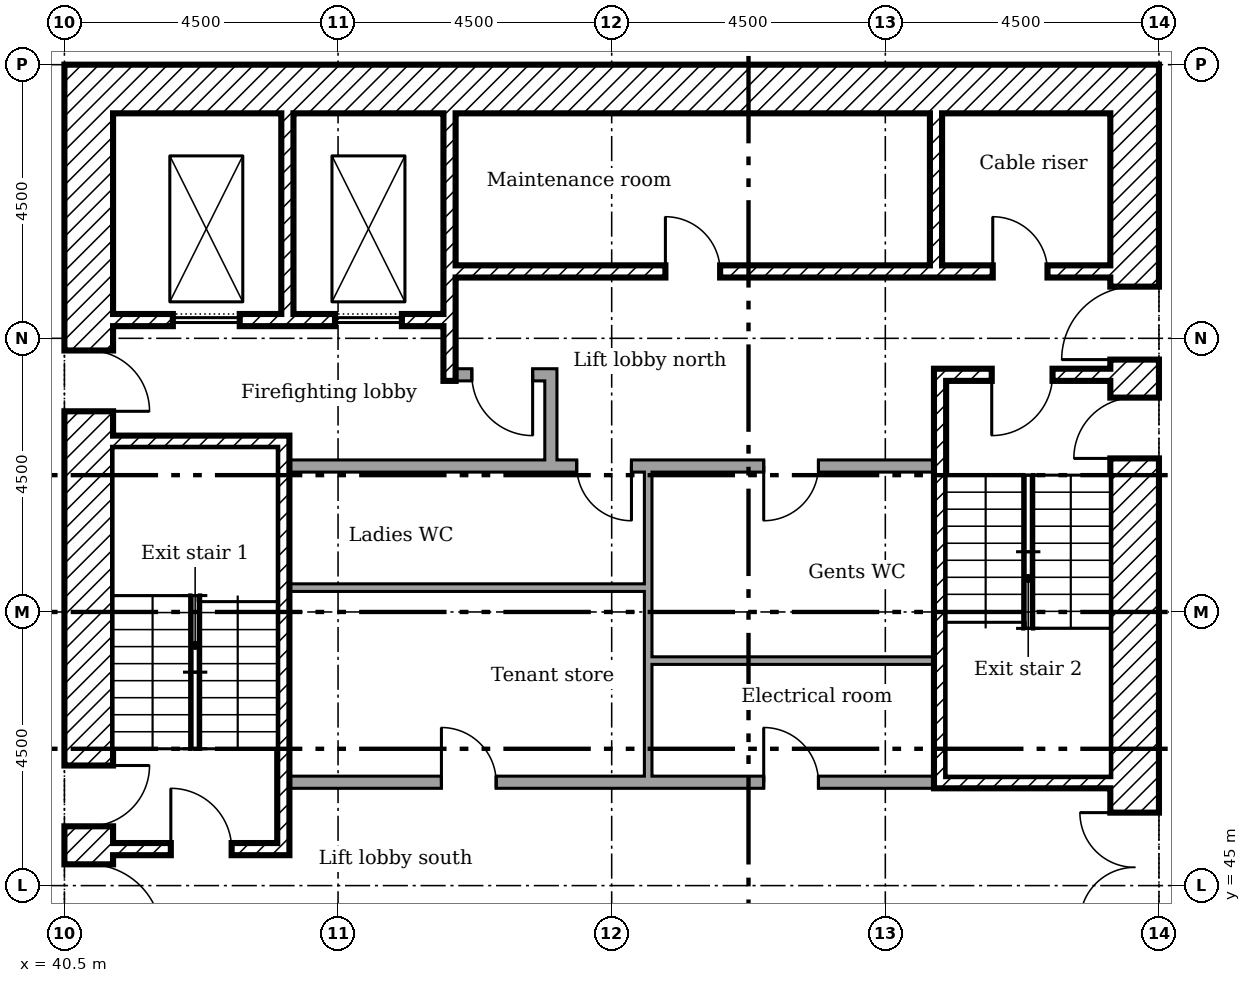
"""IFC4 building model, lengths in metres.
Left out: names, types, materials, properties, quantities, classifications, styles, units other than length and angle.
Written with IfcOpenShell. Run it as: python <this file> out.ifc"""

import sys

from ifc_helpers import new_model, si_unit, direction, frame, frame_2d, origin, place, context, subcontext, project, spatial, rectangle, extrude, element, fill, save


model = new_model("IFC4")
c1 = context("Model", 3, precision=1e-05, world=origin(), true_north=direction((0.0, 1.0)))
c2 = subcontext(c1, "Body", "Model", "MODEL_VIEW")
j1 = project(units=[si_unit("LENGTHUNIT", "METRE"), si_unit("PLANEANGLEUNIT", "RADIAN")], contexts=[c1])
p1 = place(None, origin())
s1 = spatial("IfcSite", under=j1, at=p1, CompositionType="ELEMENT")
p2 = place(p1, origin())
s2 = spatial("IfcBuilding", under=s1, at=p2, CompositionType="ELEMENT")
p3 = place(p2, frame((0.0, 0.0, 47.4)))
s3 = spatial("IfcBuildingStorey", under=s2, at=p3, CompositionType="ELEMENT", Elevation=47.4)
p4 = place(p3, frame((58.1, 40.5, 0.0), z_axis=(0.0, 0.0, 1.0), x_axis=(0.0, 1.0, 0.0)))
e1 = element("IfcWall", 1, at=p4, inside=s3, PredefinedType="SHEAR", context=c2, shape_type="SweptSolid", body=[
    extrude(rectangle(XDim=18.0, YDim=0.8, at=frame_2d((9.0, 0.0))), origin(), (0.0, 0.0, 1.0), 3.35),
])
p5 = place(p4, frame((13.15, 0.0, 0.0)))
e2 = element("IfcOpeningElement", 2, at=p5, cuts=e1, PredefinedType="OPENING", context=c2, shape_type="SweptSolid", body=[
    extrude(rectangle(XDim=1.2, YDim=2.1, at=frame_2d((0.6, 1.05))), frame((0.0, 0.41, 0.0), z_axis=(0.0, -1.0, 0.0), x_axis=(1.0, 0.0, 0.0)), (0.0, 0.0, 1.0), 0.82),
])
p6 = place(p4, frame((3.9, 0.0, 0.0)))
e3 = element("IfcOpeningElement", 3, at=p6, cuts=e1, PredefinedType="OPENING", context=c2, shape_type="SweptSolid", body=[
    extrude(rectangle(XDim=1.8, YDim=2.1, at=frame_2d((0.9, 1.05))), frame((0.0, 0.41, 0.0), z_axis=(0.0, -1.0, 0.0), x_axis=(1.0, 0.0, 0.0)), (0.0, 0.0, 1.0), 0.82),
])
p7 = place(p4, frame((11.525, 0.0, 0.0)))
e4 = element("IfcOpeningElement", 4, at=p7, cuts=e1, PredefinedType="OPENING", context=c2, shape_type="SweptSolid", body=[
    extrude(rectangle(XDim=1.0, YDim=2.1, at=frame_2d((0.5, 1.05))), frame((0.0, 0.41, 0.0), z_axis=(0.0, -1.0, 0.0), x_axis=(1.0, 0.0, 0.0)), (0.0, 0.0, 1.0), 0.82),
])
p8 = place(p3, frame((41.3, 58.1, 0.0)))
e5 = element("IfcWall", 5, at=p8, inside=s3, PredefinedType="SHEAR", context=c2, shape_type="SweptSolid", body=[
    extrude(rectangle(XDim=16.4, YDim=0.8, at=frame_2d((8.2, 0.0))), origin(), (0.0, 0.0, 1.0), 3.35),
])
p9 = place(p3, frame((40.9, 40.5, 0.0), z_axis=(0.0, 0.0, 1.0), x_axis=(0.0, 1.0, 0.0)))
e6 = element("IfcWall", 6, at=p9, inside=s3, PredefinedType="SHEAR", context=c2, shape_type="SweptSolid", body=[
    extrude(rectangle(XDim=18.0, YDim=0.8, at=frame_2d((9.0, 0.0))), origin(), (0.0, 0.0, 1.0), 3.35),
])
p10 = place(p9, frame((3.65, 0.0, 0.0)))
e7 = element("IfcOpeningElement", 7, at=p10, cuts=e6, PredefinedType="OPENING", context=c2, shape_type="SweptSolid", body=[
    extrude(rectangle(XDim=1.2, YDim=2.1, at=frame_2d((0.6, 1.05))), frame((0.0, 0.41, 0.0), z_axis=(0.0, -1.0, 0.0), x_axis=(1.0, 0.0, 0.0)), (0.0, 0.0, 1.0), 0.82),
])
p11 = place(p9, frame((5.475, 0.0, 0.0)))
e8 = element("IfcOpeningElement", 8, at=p11, cuts=e6, PredefinedType="OPENING", context=c2, shape_type="SweptSolid", body=[
    extrude(rectangle(XDim=1.0, YDim=2.1, at=frame_2d((0.5, 1.05))), frame((0.0, 0.41, 0.0), z_axis=(0.0, -1.0, 0.0), x_axis=(1.0, 0.0, 0.0)), (0.0, 0.0, 1.0), 0.82),
])
p12 = place(p9, frame((12.3, 0.0, 0.0)))
e9 = element("IfcOpeningElement", 9, at=p12, cuts=e6, PredefinedType="OPENING", context=c2, shape_type="SweptSolid", body=[
    extrude(rectangle(XDim=1.0, YDim=2.1, at=frame_2d((0.5, 1.05))), frame((0.0, 0.41, 0.0), z_axis=(0.0, -1.0, 0.0), x_axis=(1.0, 0.0, 0.0)), (0.0, 0.0, 1.0), 0.82),
])
p13 = place(p3, frame((44.167, 57.7, 0.0), z_axis=(0.0, 0.0, 1.0), x_axis=(0.0, -1.0, 0.0)))
e10 = element("IfcWall", 10, at=p13, inside=s3, PredefinedType="SHEAR", context=c2, shape_type="SweptSolid", body=[
    extrude(rectangle(XDim=3.3, YDim=0.2, at=frame_2d((1.65, 0.0))), origin(), (0.0, 0.0, 1.0), 3.35),
])
p14 = place(p3, frame((46.833, 57.7, 0.0), z_axis=(0.0, 0.0, 1.0), x_axis=(0.0, -1.0, 0.0)))
e11 = element("IfcWall", 11, at=p14, inside=s3, PredefinedType="SHEAR", context=c2, shape_type="SweptSolid", body=[
    extrude(rectangle(XDim=4.4, YDim=0.2, at=frame_2d((2.2, 0.0))), origin(), (0.0, 0.0, 1.0), 3.35),
])
p15 = place(p3, frame((54.833, 57.7, 0.0), z_axis=(0.0, 0.0, 1.0), x_axis=(0.0, -1.0, 0.0)))
e12 = element("IfcWall", 12, at=p15, inside=s3, PredefinedType="SHEAR", context=c2, shape_type="SweptSolid", body=[
    extrude(rectangle(XDim=2.5, YDim=0.2, at=frame_2d((1.25, 0.0))), origin(), (0.0, 0.0, 1.0), 3.35),
])
p16 = place(p3, frame((48.5, 51.9, 0.0), z_axis=(0.0, 0.0, 1.0), x_axis=(0.0, 1.0, 0.0)))
e13 = element("IfcWall", 13, at=p16, inside=s3, PredefinedType="PARTITIONING", context=c2, shape_type="SweptSolid", body=[
    extrude(rectangle(XDim=1.6, YDim=0.2, at=frame_2d((0.8, 0.0))), origin(), (0.0, 0.0, 1.0), 3.35),
])
p17 = place(p3, frame((46.933, 53.4, 0.0)))
e14 = element("IfcWall", 14, at=p17, inside=s3, PredefinedType="PARTITIONING", context=c2, shape_type="SweptSolid", body=[
    extrude(rectangle(XDim=1.467, YDim=0.2, at=frame_2d((0.733, 0.0))), origin(), (0.0, 0.0, 1.0), 3.35),
])
p18 = place(p17, frame((0.267, 0.0, 0.0)))
e15 = element("IfcOpeningElement", 15, at=p18, cuts=e14, PredefinedType="OPENING", context=c2, shape_type="SweptSolid", body=[
    extrude(rectangle(XDim=1.0, YDim=2.1, at=frame_2d((0.5, 1.05))), frame((0.0, 0.11, 0.0), z_axis=(0.0, -1.0, 0.0), x_axis=(1.0, 0.0, 0.0)), (0.0, 0.0, 1.0), 0.22),
])
p19 = place(p3, frame((46.933, 55.1, 0.0)))
e16 = element("IfcWall", 16, at=p19, inside=s3, PredefinedType="SHEAR", context=c2, shape_type="SweptSolid", body=[
    extrude(rectangle(XDim=10.767, YDim=0.2, at=frame_2d((5.383, 0.0))), origin(), (0.0, 0.0, 1.0), 3.35),
])
p20 = place(p19, frame((8.833, 0.0, 0.0)))
e17 = element("IfcOpeningElement", 17, at=p20, cuts=e16, PredefinedType="OPENING", context=c2, shape_type="SweptSolid", body=[
    extrude(rectangle(XDim=0.9, YDim=2.1, at=frame_2d((0.45, 1.05))), frame((0.0, 0.11, 0.0), z_axis=(0.0, -1.0, 0.0), x_axis=(1.0, 0.0, 0.0)), (0.0, 0.0, 1.0), 0.22),
])
p21 = place(p19, frame((3.45, 0.0, 0.0)))
e18 = element("IfcOpeningElement", 18, at=p21, cuts=e16, PredefinedType="OPENING", context=c2, shape_type="SweptSolid", body=[
    extrude(rectangle(XDim=0.9, YDim=2.1, at=frame_2d((0.45, 1.05))), frame((0.0, 0.11, 0.0), z_axis=(0.0, -1.0, 0.0), x_axis=(1.0, 0.0, 0.0)), (0.0, 0.0, 1.0), 0.22),
])
p22 = place(p3, frame((41.3, 54.3, 0.0)))
e19 = element("IfcWall", 19, at=p22, inside=s3, PredefinedType="SHEAR", context=c2, shape_type="SweptSolid", body=[
    extrude(rectangle(XDim=5.433, YDim=0.2, at=frame_2d((2.717, 0.0))), origin(), (0.0, 0.0, 1.0), 3.35),
])
p23 = place(p22, frame((0.983, 0.0, 0.0)))
e20 = element("IfcOpeningElement", 20, at=p23, cuts=e19, PredefinedType="OPENING", context=c2, shape_type="SweptSolid", body=[
    extrude(rectangle(XDim=1.1, YDim=2.1, at=frame_2d((0.55, 1.05))), frame((0.0, 0.11, 0.0), z_axis=(0.0, -1.0, 0.0), x_axis=(1.0, 0.0, 0.0)), (0.0, 0.0, 1.0), 0.22),
])
p24 = place(p22, frame((3.65, 0.0, 0.0)))
e21 = element("IfcOpeningElement", 21, at=p24, cuts=e19, PredefinedType="OPENING", context=c2, shape_type="SweptSolid", body=[
    extrude(rectangle(XDim=1.1, YDim=2.1, at=frame_2d((0.55, 1.05))), frame((0.0, 0.11, 0.0), z_axis=(0.0, -1.0, 0.0), x_axis=(1.0, 0.0, 0.0)), (0.0, 0.0, 1.0), 0.22),
])
p25 = place(p3, frame((44.1, 45.5, 0.0), z_axis=(0.0, 0.0, 1.0), x_axis=(0.0, 1.0, 0.0)))
e22 = element("IfcWall", 22, at=p25, inside=s3, PredefinedType="SHEAR", context=c2, shape_type="SweptSolid", body=[
    extrude(rectangle(XDim=6.9, YDim=0.2, at=frame_2d((3.45, 0.0))), origin(), (0.0, 0.0, 1.0), 3.35),
])
p26 = place(p3, frame((41.3, 52.3, 0.0)))
e23 = element("IfcWall", 23, at=p26, inside=s3, PredefinedType="SHEAR", context=c2, shape_type="SweptSolid", body=[
    extrude(rectangle(XDim=2.7, YDim=0.2, at=frame_2d((1.35, 0.0))), origin(), (0.0, 0.0, 1.0), 3.35),
])
p27 = place(p3, frame((41.3, 45.6, 0.0)))
e24 = element("IfcWall", 24, at=p27, inside=s3, PredefinedType="SHEAR", context=c2, shape_type="SweptSolid", body=[
    extrude(rectangle(XDim=2.7, YDim=0.2, at=frame_2d((1.35, 0.0))), origin(), (0.0, 0.0, 1.0), 3.35),
])
p28 = place(p27, frame((0.95, 0.0, 0.0)))
e25 = element("IfcOpeningElement", 25, at=p28, cuts=e24, PredefinedType="OPENING", context=c2, shape_type="SweptSolid", body=[
    extrude(rectangle(XDim=1.0, YDim=2.1, at=frame_2d((0.5, 1.05))), frame((0.0, 0.11, 0.0), z_axis=(0.0, -1.0, 0.0), x_axis=(1.0, 0.0, 0.0)), (0.0, 0.0, 1.0), 0.22),
])
p29 = place(p3, frame((54.8, 53.4, 0.0)))
e26 = element("IfcWall", 26, at=p29, inside=s3, PredefinedType="SHEAR", context=c2, shape_type="SweptSolid", body=[
    extrude(rectangle(XDim=2.9, YDim=0.2, at=frame_2d((1.45, 0.0))), origin(), (0.0, 0.0, 1.0), 3.35),
])
p30 = place(p29, frame((0.95, 0.0, 0.0)))
e27 = element("IfcOpeningElement", 27, at=p30, cuts=e26, PredefinedType="OPENING", context=c2, shape_type="SweptSolid", body=[
    extrude(rectangle(XDim=1.0, YDim=2.1, at=frame_2d((0.5, 1.05))), frame((0.0, 0.11, 0.0), z_axis=(0.0, -1.0, 0.0), x_axis=(1.0, 0.0, 0.0)), (0.0, 0.0, 1.0), 0.22),
])
p31 = place(p3, frame((54.8, 46.7, 0.0)))
e28 = element("IfcWall", 28, at=p31, inside=s3, PredefinedType="SHEAR", context=c2, shape_type="SweptSolid", body=[
    extrude(rectangle(XDim=2.9, YDim=0.2, at=frame_2d((1.45, 0.0))), origin(), (0.0, 0.0, 1.0), 3.35),
])
p32 = place(p3, frame((54.9, 46.8, 0.0), z_axis=(0.0, 0.0, 1.0), x_axis=(0.0, 1.0, 0.0)))
e29 = element("IfcWall", 29, at=p32, inside=s3, PredefinedType="SHEAR", context=c2, shape_type="SweptSolid", body=[
    extrude(rectangle(XDim=6.5, YDim=0.2, at=frame_2d((3.25, 0.0))), origin(), (0.0, 0.0, 1.0), 3.35),
])
p33 = place(p3, frame((44.2, 51.9, 0.0)))
e30 = element("IfcWall", 30, at=p33, inside=s3, PredefinedType="PARTITIONING", context=c2, shape_type="SweptSolid", body=[
    extrude(rectangle(XDim=10.6, YDim=0.2, at=frame_2d((5.3, 0.0))), origin(), (0.0, 0.0, 1.0), 3.35),
])
p34 = place(p33, frame((4.725, 0.0, 0.0)))
e31 = element("IfcOpeningElement", 31, at=p34, cuts=e30, PredefinedType="OPENING", context=c2, shape_type="SweptSolid", body=[
    extrude(rectangle(XDim=0.9, YDim=2.1, at=frame_2d((0.45, 1.05))), frame((0.0, 0.11, 0.0), z_axis=(0.0, -1.0, 0.0), x_axis=(1.0, 0.0, 0.0)), (0.0, 0.0, 1.0), 0.22),
])
p35 = place(p33, frame((7.8, 0.0, 0.0)))
e32 = element("IfcOpeningElement", 32, at=p35, cuts=e30, PredefinedType="OPENING", context=c2, shape_type="SweptSolid", body=[
    extrude(rectangle(XDim=0.9, YDim=2.1, at=frame_2d((0.45, 1.05))), frame((0.0, 0.11, 0.0), z_axis=(0.0, -1.0, 0.0), x_axis=(1.0, 0.0, 0.0)), (0.0, 0.0, 1.0), 0.22),
])
p36 = place(p3, frame((44.2, 46.7, 0.0)))
e33 = element("IfcWall", 33, at=p36, inside=s3, PredefinedType="PARTITIONING", context=c2, shape_type="SweptSolid", body=[
    extrude(rectangle(XDim=10.6, YDim=0.2, at=frame_2d((5.3, 0.0))), origin(), (0.0, 0.0, 1.0), 3.35),
])
p37 = place(p36, frame((2.5, 0.0, 0.0)))
e34 = element("IfcOpeningElement", 34, at=p37, cuts=e33, PredefinedType="OPENING", context=c2, shape_type="SweptSolid", body=[
    extrude(rectangle(XDim=0.9, YDim=2.1, at=frame_2d((0.45, 1.05))), frame((0.0, 0.11, 0.0), z_axis=(0.0, -1.0, 0.0), x_axis=(1.0, 0.0, 0.0)), (0.0, 0.0, 1.0), 0.22),
])
p38 = place(p36, frame((7.8, 0.0, 0.0)))
e35 = element("IfcOpeningElement", 35, at=p38, cuts=e33, PredefinedType="OPENING", context=c2, shape_type="SweptSolid", body=[
    extrude(rectangle(XDim=0.9, YDim=2.1, at=frame_2d((0.45, 1.05))), frame((0.0, 0.11, 0.0), z_axis=(0.0, -1.0, 0.0), x_axis=(1.0, 0.0, 0.0)), (0.0, 0.0, 1.0), 0.22),
])
p39 = place(p3, frame((50.1, 46.8, 0.0), z_axis=(0.0, 0.0, 1.0), x_axis=(0.0, 1.0, 0.0)))
e36 = element("IfcWall", 36, at=p39, inside=s3, PredefinedType="PARTITIONING", context=c2, shape_type="SweptSolid", body=[
    extrude(rectangle(XDim=1.962, YDim=0.125, at=frame_2d((0.981, 0.0))), origin(), (0.0, 0.0, 1.0), 3.35),
])
p40 = place(p3, frame((54.8, 48.7, 0.0), z_axis=(0.0, 0.0, 1.0), x_axis=(-1.0, 0.0, 0.0)))
e37 = element("IfcWall", 37, at=p40, inside=s3, PredefinedType="PARTITIONING", context=c2, shape_type="SweptSolid", body=[
    extrude(rectangle(XDim=4.637, YDim=0.125, at=frame_2d((2.319, 0.0))), origin(), (0.0, 0.0, 1.0), 3.35),
])
p41 = place(p3, frame((50.1, 48.7, 0.0), z_axis=(0.0, 0.0, 1.0), x_axis=(0.0, 1.0, 0.0)))
e38 = element("IfcWall", 38, at=p41, inside=s3, PredefinedType="PARTITIONING", context=c2, shape_type="SweptSolid", body=[
    extrude(rectangle(XDim=1.262, YDim=0.125, at=frame_2d((0.631, 0.0))), origin(), (0.0, 0.0, 1.0), 3.35),
])
p42 = place(p3, frame((50.038, 49.9, 0.0), z_axis=(0.0, 0.0, 1.0), x_axis=(-1.0, 0.0, 0.0)))
e39 = element("IfcWall", 39, at=p42, inside=s3, PredefinedType="PARTITIONING", context=c2, shape_type="SweptSolid", body=[
    extrude(rectangle(XDim=5.838, YDim=0.125, at=frame_2d((2.919, 0.0))), origin(), (0.0, 0.0, 1.0), 3.35),
])
p43 = place(p3, frame((50.1, 49.9, 0.0), z_axis=(0.0, 0.0, 1.0), x_axis=(0.0, 1.0, 0.0)))
e40 = element("IfcWall", 40, at=p43, inside=s3, PredefinedType="PARTITIONING", context=c2, shape_type="SweptSolid", body=[
    extrude(rectangle(XDim=1.9, YDim=0.125, at=frame_2d((0.95, 0.0))), origin(), (0.0, 0.0, 1.0), 3.35),
])
p44 = place(p5, origin())
e41 = element("IfcDoor", 41, at=p44, inside=s3, OperationType="SINGLE_SWING_RIGHT", PredefinedType="DOOR", context=c2, shape_type="SweptSolid", body=[
    extrude(rectangle(XDim=1.2, YDim=2.1, at=frame_2d((0.6, 1.05))), frame((0.0, 0.025, 0.0), z_axis=(0.0, -1.0, 0.0), x_axis=(1.0, 0.0, 0.0)), (0.0, 0.0, 1.0), 0.05),
])
fill(e2, e41)
p45 = place(p6, origin())
e42 = element("IfcDoor", 42, at=p45, inside=s3, OperationType="DOUBLE_DOOR_SINGLE_SWING", PredefinedType="DOOR", context=c2, shape_type="SweptSolid", body=[
    extrude(rectangle(XDim=1.8, YDim=2.1, at=frame_2d((0.9, 1.05))), frame((0.0, 0.025, 0.0), z_axis=(0.0, -1.0, 0.0), x_axis=(1.0, 0.0, 0.0)), (0.0, 0.0, 1.0), 0.05),
])
fill(e3, e42)
p46 = place(p10, frame((1.2, 0.0, 0.0), x_axis=(-1.0, 0.0, 0.0)))
e43 = element("IfcDoor", 43, at=p46, inside=s3, OperationType="SINGLE_SWING_LEFT", PredefinedType="DOOR", context=c2, shape_type="SweptSolid", body=[
    extrude(rectangle(XDim=1.2, YDim=2.1, at=frame_2d((0.6, 1.05))), frame((0.0, 0.025, 0.0), z_axis=(0.0, -1.0, 0.0), x_axis=(1.0, 0.0, 0.0)), (0.0, 0.0, 1.0), 0.05),
])
fill(e7, e43)
p47 = place(p28, origin())
e44 = element("IfcDoor", 44, at=p47, inside=s3, OperationType="SINGLE_SWING_RIGHT", PredefinedType="DOOR", context=c2, shape_type="SweptSolid", body=[
    extrude(rectangle(XDim=1.0, YDim=2.1, at=frame_2d((0.5, 1.05))), frame((0.0, 0.025, 0.0), z_axis=(0.0, -1.0, 0.0), x_axis=(1.0, 0.0, 0.0)), (0.0, 0.0, 1.0), 0.05),
])
fill(e25, e44)
p48 = place(p11, frame((1.0, 0.0, 0.0), x_axis=(-1.0, 0.0, 0.0)))
e45 = element("IfcDoor", 45, at=p48, inside=s3, OperationType="SINGLE_SWING_RIGHT", PredefinedType="DOOR", context=c2, shape_type="SweptSolid", body=[
    extrude(rectangle(XDim=1.0, YDim=2.1, at=frame_2d((0.5, 1.05))), frame((0.0, 0.025, 0.0), z_axis=(0.0, -1.0, 0.0), x_axis=(1.0, 0.0, 0.0)), (0.0, 0.0, 1.0), 0.05),
])
fill(e8, e45)
p49 = place(p30, frame((1.0, 0.0, 0.0), x_axis=(-1.0, 0.0, 0.0)))
e46 = element("IfcDoor", 46, at=p49, inside=s3, OperationType="SINGLE_SWING_LEFT", PredefinedType="DOOR", context=c2, shape_type="SweptSolid", body=[
    extrude(rectangle(XDim=1.0, YDim=2.1, at=frame_2d((0.5, 1.05))), frame((0.0, 0.025, 0.0), z_axis=(0.0, -1.0, 0.0), x_axis=(1.0, 0.0, 0.0)), (0.0, 0.0, 1.0), 0.05),
])
fill(e27, e46)
p50 = place(p7, origin())
e47 = element("IfcDoor", 47, at=p50, inside=s3, OperationType="SINGLE_SWING_RIGHT", PredefinedType="DOOR", context=c2, shape_type="SweptSolid", body=[
    extrude(rectangle(XDim=1.0, YDim=2.1, at=frame_2d((0.5, 1.05))), frame((0.0, 0.025, 0.0), z_axis=(0.0, -1.0, 0.0), x_axis=(1.0, 0.0, 0.0)), (0.0, 0.0, 1.0), 0.05),
])
fill(e4, e47)
p51 = place(p18, frame((1.0, 0.0, 0.0), x_axis=(-1.0, 0.0, 0.0)))
e48 = element("IfcDoor", 48, at=p51, inside=s3, OperationType="SINGLE_SWING_RIGHT", PredefinedType="DOOR", context=c2, shape_type="SweptSolid", body=[
    extrude(rectangle(XDim=1.0, YDim=2.1, at=frame_2d((0.5, 1.05))), frame((0.0, 0.025, 0.0), z_axis=(0.0, -1.0, 0.0), x_axis=(1.0, 0.0, 0.0)), (0.0, 0.0, 1.0), 0.05),
])
fill(e15, e48)
p52 = place(p12, frame((1.0, 0.0, 0.0), x_axis=(-1.0, 0.0, 0.0)))
e49 = element("IfcDoor", 49, at=p52, inside=s3, OperationType="SINGLE_SWING_LEFT", PredefinedType="DOOR", context=c2, shape_type="SweptSolid", body=[
    extrude(rectangle(XDim=1.0, YDim=2.1, at=frame_2d((0.5, 1.05))), frame((0.0, 0.025, 0.0), z_axis=(0.0, -1.0, 0.0), x_axis=(1.0, 0.0, 0.0)), (0.0, 0.0, 1.0), 0.05),
])
fill(e9, e49)
p53 = place(p20, origin())
e50 = element("IfcDoor", 50, at=p53, inside=s3, OperationType="SINGLE_SWING_RIGHT", PredefinedType="DOOR", context=c2, shape_type="SweptSolid", body=[
    extrude(rectangle(XDim=0.9, YDim=2.1, at=frame_2d((0.45, 1.05))), frame((0.0, 0.025, 0.0), z_axis=(0.0, -1.0, 0.0), x_axis=(1.0, 0.0, 0.0)), (0.0, 0.0, 1.0), 0.05),
])
fill(e17, e50)
p54 = place(p21, origin())
e51 = element("IfcDoor", 51, at=p54, inside=s3, OperationType="SINGLE_SWING_RIGHT", PredefinedType="DOOR", context=c2, shape_type="SweptSolid", body=[
    extrude(rectangle(XDim=0.9, YDim=2.1, at=frame_2d((0.45, 1.05))), frame((0.0, 0.025, 0.0), z_axis=(0.0, -1.0, 0.0), x_axis=(1.0, 0.0, 0.0)), (0.0, 0.0, 1.0), 0.05),
])
fill(e18, e51)
p55 = place(p37, origin())
e52 = element("IfcDoor", 52, at=p55, inside=s3, OperationType="SINGLE_SWING_RIGHT", PredefinedType="DOOR", context=c2, shape_type="SweptSolid", body=[
    extrude(rectangle(XDim=0.9, YDim=2.1, at=frame_2d((0.45, 1.05))), frame((0.0, 0.025, 0.0), z_axis=(0.0, -1.0, 0.0), x_axis=(1.0, 0.0, 0.0)), (0.0, 0.0, 1.0), 0.05),
])
fill(e34, e52)
p56 = place(p34, frame((0.9, 0.0, 0.0), x_axis=(-1.0, 0.0, 0.0)))
e53 = element("IfcDoor", 53, at=p56, inside=s3, OperationType="SINGLE_SWING_RIGHT", PredefinedType="DOOR", context=c2, shape_type="SweptSolid", body=[
    extrude(rectangle(XDim=0.9, YDim=2.1, at=frame_2d((0.45, 1.05))), frame((0.0, 0.025, 0.0), z_axis=(0.0, -1.0, 0.0), x_axis=(1.0, 0.0, 0.0)), (0.0, 0.0, 1.0), 0.05),
])
fill(e31, e53)
p57 = place(p38, origin())
e54 = element("IfcDoor", 54, at=p57, inside=s3, OperationType="SINGLE_SWING_RIGHT", PredefinedType="DOOR", context=c2, shape_type="SweptSolid", body=[
    extrude(rectangle(XDim=0.9, YDim=2.1, at=frame_2d((0.45, 1.05))), frame((0.0, 0.025, 0.0), z_axis=(0.0, -1.0, 0.0), x_axis=(1.0, 0.0, 0.0)), (0.0, 0.0, 1.0), 0.05),
])
fill(e35, e54)
p58 = place(p35, frame((0.9, 0.0, 0.0), x_axis=(-1.0, 0.0, 0.0)))
e55 = element("IfcDoor", 55, at=p58, inside=s3, OperationType="SINGLE_SWING_LEFT", PredefinedType="DOOR", context=c2, shape_type="SweptSolid", body=[
    extrude(rectangle(XDim=0.9, YDim=2.1, at=frame_2d((0.45, 1.05))), frame((0.0, 0.025, 0.0), z_axis=(0.0, -1.0, 0.0), x_axis=(1.0, 0.0, 0.0)), (0.0, 0.0, 1.0), 0.05),
])
fill(e32, e55)
p59 = place(p23, origin())
e56 = element("IfcDoor", 56, at=p59, inside=s3, OperationType="SLIDING_TO_LEFT", PredefinedType="DOOR", context=c2, shape_type="SweptSolid", body=[
    extrude(rectangle(XDim=1.1, YDim=2.1, at=frame_2d((0.55, 1.05))), frame((0.0, 0.025, 0.0), z_axis=(0.0, -1.0, 0.0), x_axis=(1.0, 0.0, 0.0)), (0.0, 0.0, 1.0), 0.05),
])
fill(e20, e56)
p60 = place(p24, origin())
e57 = element("IfcDoor", 57, at=p60, inside=s3, OperationType="SLIDING_TO_LEFT", PredefinedType="DOOR", context=c2, shape_type="SweptSolid", body=[
    extrude(rectangle(XDim=1.1, YDim=2.1, at=frame_2d((0.55, 1.05))), frame((0.0, 0.025, 0.0), z_axis=(0.0, -1.0, 0.0), x_axis=(1.0, 0.0, 0.0)), (0.0, 0.0, 1.0), 0.05),
])
fill(e21, e57)
save(model, sys.argv[1])
